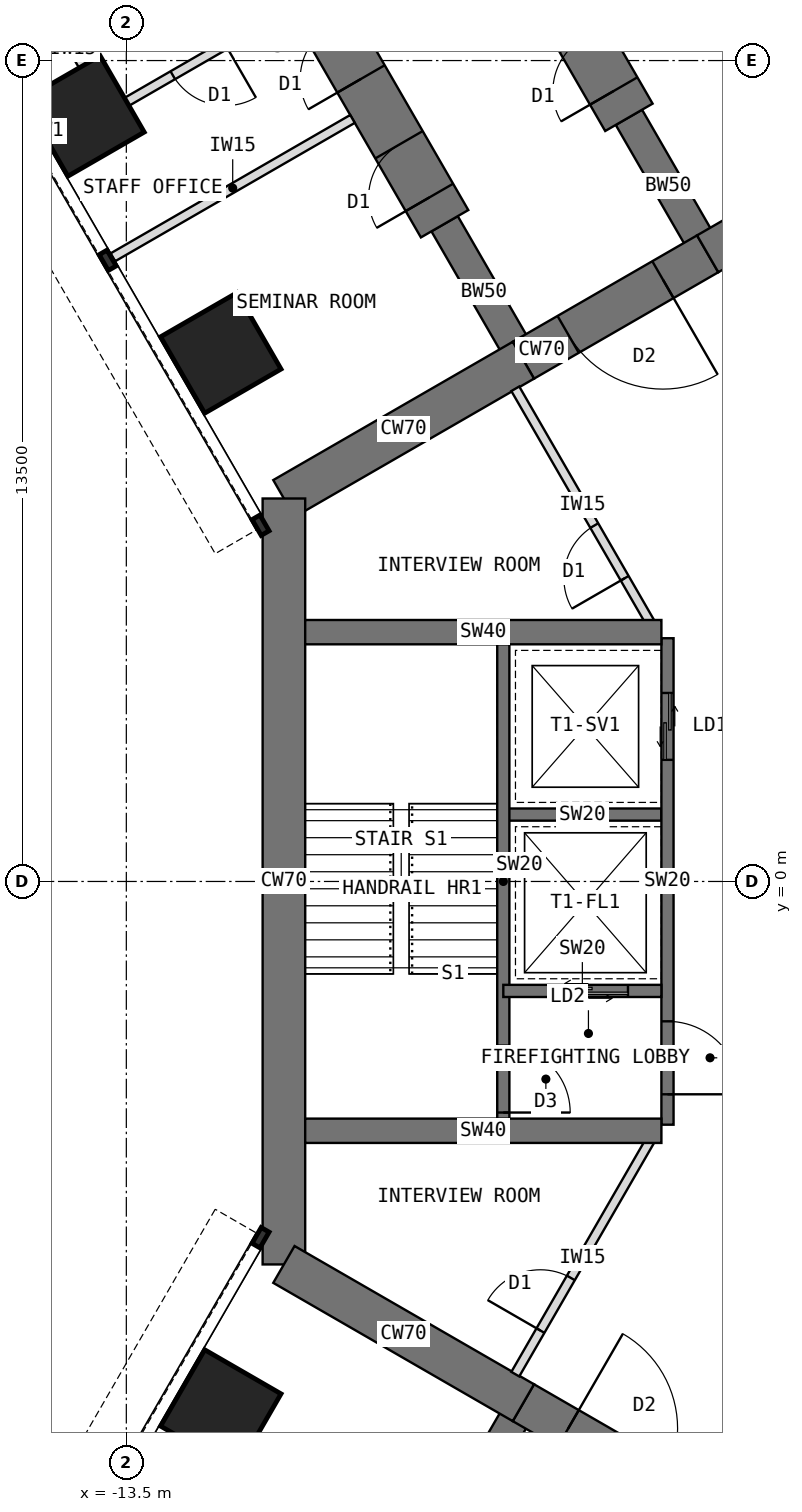
"""IFC4 building model, lengths in metres.
Left out: names, types, materials, properties, quantities, classifications, styles, units other than length and angle.
Written with IfcOpenShell. Run it as: python <this file> out.ifc"""

import sys

from ifc_helpers import new_model, si_unit, direction, frame, frame_2d, origin, origin_2d, place, context, subcontext, project, spatial, rectangle, extrude, element, fill, save


model = new_model("IFC4")
c1 = context("Model", 3, precision=1e-05, world=origin(), true_north=direction((0.0, 1.0)))
c2 = subcontext(c1, "Body", "Model", "MODEL_VIEW")
j1 = project(units=[si_unit("LENGTHUNIT", "METRE"), si_unit("PLANEANGLEUNIT", "RADIAN")], contexts=[c1])
p1 = place(None, origin())
s1 = spatial("IfcSite", under=j1, at=p1, CompositionType="ELEMENT")
p2 = place(p1, origin())
s2 = spatial("IfcBuilding", under=s1, at=p2, CompositionType="ELEMENT")
p3 = place(p2, frame((0.0, 0.0, 60.5)))
s3 = spatial("IfcBuildingStorey", under=s2, at=p3, CompositionType="ELEMENT", Elevation=60.5)
p4 = place(p3, frame((0.0, 12.596, 0.0), z_axis=(0.0, 0.0, 1.0), x_axis=(-0.866011268655, -0.500024481964, 0.0)))
e1 = element("IfcWall", 1, at=p4, inside=s3, PredefinedType="SHEAR", context=c2, shape_type="SweptSolid", body=[
    extrude(rectangle(XDim=4.548, YDim=0.7, at=frame_2d((2.274, 0.0))), origin(), (0.0, 0.0, 1.0), 4.0),
])
p5 = place(p3, frame((-3.939, 10.322, 0.0), z_axis=(0.0, 0.0, 1.0), x_axis=(-0.866019471182, -0.500010275428, 0.0)))
e2 = element("IfcWall", 2, at=p5, inside=s3, PredefinedType="SHEAR", context=c2, shape_type="SweptSolid", body=[
    extrude(rectangle(XDim=3.5, YDim=0.7, at=frame_2d((1.75, 0.0))), origin(), (0.0, 0.0, 1.0), 4.0),
])
p6 = place(p5, frame((0.85, 0.0, 0.0)))
e3 = element("IfcOpeningElement", 3, at=p6, cuts=e2, PredefinedType="OPENING", context=c2, shape_type="SweptSolid", body=[
    extrude(rectangle(XDim=1.8, YDim=2.1, at=frame_2d((0.9, 1.05))), frame((0.0, 0.36, 0.0), z_axis=(0.0, -1.0, 0.0), x_axis=(1.0, 0.0, 0.0)), (0.0, 0.0, 1.0), 0.72),
])
p7 = place(p3, frame((-6.97, 8.572, 0.0), z_axis=(0.0, 0.0, 1.0), x_axis=(-0.866034513004, -0.499984222037, 0.0)))
e4 = element("IfcWall", 4, at=p7, inside=s3, PredefinedType="SHEAR", context=c2, shape_type="SweptSolid", body=[
    extrude(rectangle(XDim=4.548, YDim=0.7, at=frame_2d((2.274, 0.0))), origin(), (0.0, 0.0, 1.0), 4.0),
])
p8 = place(p3, frame((-10.908, 6.298, 0.0), z_axis=(0.0, 0.0, 1.0), x_axis=(0.0, -1.0, 0.0)))
e5 = element("IfcWall", 5, at=p8, inside=s3, PredefinedType="SHEAR", context=c2, shape_type="SweptSolid", body=[
    extrude(rectangle(XDim=12.596, YDim=0.7, at=frame_2d((6.298, 0.0))), origin(), (0.0, 0.0, 1.0), 4.0),
])
p9 = place(p3, frame((-10.908, -6.298, 0.0), z_axis=(0.0, 0.0, 1.0), x_axis=(0.866034513004, -0.499984222037, 0.0)))
e6 = element("IfcWall", 6, at=p9, inside=s3, PredefinedType="SHEAR", context=c2, shape_type="SweptSolid", body=[
    extrude(rectangle(XDim=4.548, YDim=0.7, at=frame_2d((2.274, 0.0))), origin(), (0.0, 0.0, 1.0), 4.0),
])
p10 = place(p3, frame((-6.97, -8.572, 0.0), z_axis=(0.0, 0.0, 1.0), x_axis=(0.866019471182, -0.500010275428, 0.0)))
e7 = element("IfcWall", 7, at=p10, inside=s3, PredefinedType="SHEAR", context=c2, shape_type="SweptSolid", body=[
    extrude(rectangle(XDim=3.5, YDim=0.7, at=frame_2d((1.75, 0.0))), origin(), (0.0, 0.0, 1.0), 4.0),
])
p11 = place(p10, frame((0.85, 0.0, 0.0)))
e8 = element("IfcOpeningElement", 8, at=p11, cuts=e7, PredefinedType="OPENING", context=c2, shape_type="SweptSolid", body=[
    extrude(rectangle(XDim=1.8, YDim=2.1, at=frame_2d((0.9, 1.05))), frame((0.0, 0.36, 0.0), z_axis=(0.0, -1.0, 0.0), x_axis=(1.0, 0.0, 0.0)), (0.0, 0.0, 1.0), 0.72),
])
p12 = place(p3, frame((-6.97, 8.572, 0.0), z_axis=(0.0, 0.0, 1.0), x_axis=(-0.499988811324, 0.866031863473, 0.0)))
e9 = element("IfcWall", 9, at=p12, inside=s3, PredefinedType="SHEAR", context=c2, shape_type="SweptSolid", body=[
    extrude(rectangle(XDim=2.592, YDim=0.5, at=frame_2d((1.296, 0.0))), origin(), (0.0, 0.0, 1.0), 4.0),
])
p13 = place(p3, frame((-8.266, 10.816, 0.0), z_axis=(0.0, 0.0, 1.0), x_axis=(-0.499996231654, 0.866027579429, 0.0)))
e10 = element("IfcWall", 10, at=p13, inside=s3, PredefinedType="SHEAR", context=c2, shape_type="SweptSolid", body=[
    extrude(rectangle(XDim=13.2, YDim=0.9, at=frame_2d((6.6, 0.0))), origin(), (0.0, 0.0, 1.0), 4.0),
])
p14 = place(p13, frame((0.5, 0.0, 0.0)))
e11 = element("IfcOpeningElement", 11, at=p14, cuts=e10, PredefinedType="OPENING", context=c2, shape_type="SweptSolid", body=[
    extrude(rectangle(XDim=1.0, YDim=2.1, at=frame_2d((0.5, 1.05))), frame((0.0, 0.46, 0.0), z_axis=(0.0, -1.0, 0.0), x_axis=(1.0, 0.0, 0.0)), (0.0, 0.0, 1.0), 0.92),
])
p15 = place(p13, frame((2.75, 0.0, 0.0)))
e12 = element("IfcOpeningElement", 12, at=p15, cuts=e10, PredefinedType="OPENING", context=c2, shape_type="SweptSolid", body=[
    extrude(rectangle(XDim=1.0, YDim=2.1, at=frame_2d((0.5, 1.05))), frame((0.0, 0.46, 0.0), z_axis=(0.0, -1.0, 0.0), x_axis=(1.0, 0.0, 0.0)), (0.0, 0.0, 1.0), 0.92),
])
p16 = place(p13, frame((7.25, 0.0, 0.0)))
e13 = element("IfcOpeningElement", 13, at=p16, cuts=e10, PredefinedType="OPENING", context=c2, shape_type="SweptSolid", body=[
    extrude(rectangle(XDim=1.0, YDim=2.1, at=frame_2d((0.5, 1.05))), frame((0.0, 0.46, 0.0), z_axis=(0.0, -1.0, 0.0), x_axis=(1.0, 0.0, 0.0)), (0.0, 0.0, 1.0), 0.92),
])
p17 = place(p3, frame((-3.939, 10.322, 0.0), z_axis=(0.0, 0.0, 1.0), x_axis=(-0.499918158782, 0.866072649678, 0.0)))
e14 = element("IfcWall", 14, at=p17, inside=s3, PredefinedType="SHEAR", context=c2, shape_type="SweptSolid", body=[
    extrude(rectangle(XDim=2.592, YDim=0.5, at=frame_2d((1.296, 0.0))), origin(), (0.0, 0.0, 1.0), 4.0),
])
p18 = place(p3, frame((-5.234, 12.566, 0.0), z_axis=(0.0, 0.0, 1.0), x_axis=(-0.500010103361, 0.866019570528, 0.0)))
e15 = element("IfcWall", 15, at=p18, inside=s3, PredefinedType="SHEAR", context=c2, shape_type="SweptSolid", body=[
    extrude(rectangle(XDim=13.2, YDim=0.9, at=frame_2d((6.6, 0.0))), origin(), (0.0, 0.0, 1.0), 4.0),
])
p19 = place(p18, frame((0.5, 0.0, 0.0)))
e16 = element("IfcOpeningElement", 16, at=p19, cuts=e15, PredefinedType="OPENING", context=c2, shape_type="SweptSolid", body=[
    extrude(rectangle(XDim=1.0, YDim=2.1, at=frame_2d((0.5, 1.05))), frame((0.0, 0.46, 0.0), z_axis=(0.0, -1.0, 0.0), x_axis=(1.0, 0.0, 0.0)), (0.0, 0.0, 1.0), 0.92),
])
p20 = place(p18, frame((2.75, 0.0, 0.0)))
e17 = element("IfcOpeningElement", 17, at=p20, cuts=e15, PredefinedType="OPENING", context=c2, shape_type="SweptSolid", body=[
    extrude(rectangle(XDim=1.0, YDim=2.1, at=frame_2d((0.5, 1.05))), frame((0.0, 0.46, 0.0), z_axis=(0.0, -1.0, 0.0), x_axis=(1.0, 0.0, 0.0)), (0.0, 0.0, 1.0), 0.92),
])
p21 = place(p18, frame((7.25, 0.0, 0.0)))
e18 = element("IfcOpeningElement", 18, at=p21, cuts=e15, PredefinedType="OPENING", context=c2, shape_type="SweptSolid", body=[
    extrude(rectangle(XDim=1.0, YDim=2.1, at=frame_2d((0.5, 1.05))), frame((0.0, 0.46, 0.0), z_axis=(0.0, -1.0, 0.0), x_axis=(1.0, 0.0, 0.0)), (0.0, 0.0, 1.0), 0.92),
])
p22 = place(p3, frame((-6.97, -8.572, 0.0), z_axis=(0.0, 0.0, 1.0), x_axis=(-0.499988811324, -0.866031863473, 0.0)))
e19 = element("IfcWall", 19, at=p22, inside=s3, PredefinedType="SHEAR", context=c2, shape_type="SweptSolid", body=[
    extrude(rectangle(XDim=2.592, YDim=0.5, at=frame_2d((1.296, 0.0))), origin(), (0.0, 0.0, 1.0), 4.0),
])
for number, where, z_axis, x_axis in (
    (20, (-11.946, 8.691, 0.0), (0.0, 0.0, 1.0), (0.866, 0.5, 0.0)),
    (21, (-14.196, 12.588, 0.0), (0.0, 0.0, 1.0), (0.866, 0.5, 0.0)),
    (22, (-11.946, -8.691, 0.0), (0.0, 0.0, 1.0), (0.5, 0.866, 0.0)),
):
    element("IfcColumn", number, at=place(p3, frame(where, z_axis=z_axis, x_axis=x_axis)), inside=s3, PredefinedType="COLUMN", context=c2, shape_type="SweptSolid", body=[
        extrude(rectangle(XDim=1.45, YDim=1.45, at=origin_2d()), origin(), (0.0, 0.0, 1.0), 4.0),
    ])
p23 = place(p3, frame((-4.6, 4.0, 0.0), z_axis=(0.0, 0.0, 1.0), x_axis=(0.0, -1.0, 0.0)))
e23 = element("IfcWall", 23, at=p23, inside=s3, PredefinedType="SHEAR", context=c2, shape_type="SweptSolid", body=[
    extrude(rectangle(XDim=8.0, YDim=0.2, at=frame_2d((4.0, 0.0))), origin(), (0.0, 0.0, 1.0), 4.0),
])
p24 = place(p23, frame((6.3, 0.0, 0.0)))
e24 = element("IfcOpeningElement", 24, at=p24, cuts=e23, PredefinedType="OPENING", context=c2, shape_type="SweptSolid", body=[
    extrude(rectangle(XDim=1.2, YDim=2.1, at=frame_2d((0.6, 1.05))), frame((0.0, 0.11, 0.0), z_axis=(0.0, -1.0, 0.0), x_axis=(1.0, 0.0, 0.0)), (0.0, 0.0, 1.0), 0.22),
])
p25 = place(p23, frame((0.9, 0.0, 0.0)))
e25 = element("IfcOpeningElement", 25, at=p25, cuts=e23, PredefinedType="OPENING", context=c2, shape_type="SweptSolid", body=[
    extrude(rectangle(XDim=1.1, YDim=2.2, at=frame_2d((0.55, 1.1))), frame((0.0, 0.11, 0.0), z_axis=(0.0, -1.0, 0.0), x_axis=(1.0, 0.0, 0.0)), (0.0, 0.0, 1.0), 0.22),
])
p26 = place(p3, frame((-4.7, 1.1, 0.0), z_axis=(0.0, 0.0, 1.0), x_axis=(-1.0, 0.0, 0.0)))
e26 = element("IfcWall", 26, at=p26, inside=s3, PredefinedType="SHEAR", context=c2, shape_type="SweptSolid", body=[
    extrude(rectangle(XDim=2.6, YDim=0.2, at=frame_2d((1.3, 0.0))), origin(), (0.0, 0.0, 1.0), 4.0),
])
p27 = place(p3, frame((-4.7, -1.8, 0.0), z_axis=(0.0, 0.0, 1.0), x_axis=(-1.0, 0.0, 0.0)))
e27 = element("IfcWall", 27, at=p27, inside=s3, PredefinedType="SHEAR", context=c2, shape_type="SweptSolid", body=[
    extrude(rectangle(XDim=2.6, YDim=0.2, at=frame_2d((1.3, 0.0))), origin(), (0.0, 0.0, 1.0), 4.0),
])
p28 = place(p27, frame((0.55, 0.0, 0.0)))
e28 = element("IfcOpeningElement", 28, at=p28, cuts=e27, PredefinedType="OPENING", context=c2, shape_type="SweptSolid", body=[
    extrude(rectangle(XDim=1.3, YDim=2.2, at=frame_2d((0.65, 1.1))), frame((0.0, 0.11, 0.0), z_axis=(0.0, -1.0, 0.0), x_axis=(1.0, 0.0, 0.0)), (0.0, 0.0, 1.0), 0.22),
])
p29 = place(p3, frame((-7.3, 4.0, 0.0), z_axis=(0.0, 0.0, 1.0), x_axis=(0.0, -1.0, 0.0)))
e29 = element("IfcWall", 29, at=p29, inside=s3, PredefinedType="SHEAR", context=c2, shape_type="SweptSolid", body=[
    extrude(rectangle(XDim=8.0, YDim=0.2, at=frame_2d((4.0, 0.0))), origin(), (0.0, 0.0, 1.0), 4.0),
])
p30 = place(p29, frame((6.7, 0.0, 0.0)))
e30 = element("IfcOpeningElement", 30, at=p30, cuts=e29, PredefinedType="OPENING", context=c2, shape_type="SweptSolid", body=[
    extrude(rectangle(XDim=1.1, YDim=2.1, at=frame_2d((0.55, 1.05))), frame((0.0, 0.11, 0.0), z_axis=(0.0, -1.0, 0.0), x_axis=(1.0, 0.0, 0.0)), (0.0, 0.0, 1.0), 0.22),
])
for number, where, z_axis, x_axis in (
    (31, (-4.7, -4.1, 0.0), (0.0, 0.0, 1.0), (-1.0, 0.0, 0.0)),
    (32, (-4.7, 4.1, 0.0), (0.0, 0.0, 1.0), (-1.0, 0.0, 0.0)),
):
    element("IfcWall", number, at=place(p3, frame(where, z_axis=z_axis, x_axis=x_axis)), inside=s3, PredefinedType="SHEAR", context=c2, shape_type="SweptSolid", body=[
        extrude(rectangle(XDim=5.858, YDim=0.4, at=frame_2d((2.929, 0.0))), origin(), (0.0, 0.0, 1.0), 4.0),
    ])
p31 = place(p3, frame((-9.78, 12.54, 0.0), z_axis=(0.0, 0.0, 1.0), x_axis=(-0.866035472144, -0.499982560684, 0.0)))
e33 = element("IfcWall", 33, at=p31, inside=s3, PredefinedType="PARTITIONING", context=c2, shape_type="SweptSolid", body=[
    extrude(rectangle(XDim=4.55, YDim=0.15, at=frame_2d((2.275, 0.0))), origin(), (0.0, 0.0, 1.0), 3.8),
])
p32 = place(p3, frame((-13.775, 12.658, 0.0), z_axis=(0.0, 0.0, 1.0), x_axis=(-0.500033551112, 0.866006032174, 0.0)))
e34 = element("IfcWall", 34, at=p32, inside=s3, PredefinedType="PARTITIONING", context=c2, shape_type="SweptSolid", body=[
    extrude(rectangle(XDim=2.4, YDim=0.15, at=frame_2d((1.2, 0.0))), origin(), (0.0, 0.0, 1.0), 3.8),
])
p33 = place(p3, frame((-10.83, 14.359, 0.0), z_axis=(0.0, 0.0, 1.0), x_axis=(-0.865989465428, -0.500062241894, 0.0)))
e35 = element("IfcWall", 35, at=p33, inside=s3, PredefinedType="PARTITIONING", context=c2, shape_type="SweptSolid", body=[
    extrude(rectangle(XDim=3.4, YDim=0.15, at=frame_2d((1.7, 0.0))), origin(), (0.0, 0.0, 1.0), 3.8),
])
p34 = place(p33, frame((1.2, 0.0, 0.0)))
e36 = element("IfcOpeningElement", 36, at=p34, cuts=e35, PredefinedType="OPENING", context=c2, shape_type="SweptSolid", body=[
    extrude(rectangle(XDim=1.0, YDim=2.1, at=frame_2d((0.5, 1.05))), frame((0.0, 0.085, 0.0), z_axis=(0.0, -1.0, 0.0), x_axis=(1.0, 0.0, 0.0)), (0.0, 0.0, 1.0), 0.17),
])
p35 = place(p3, frame((-7.103, -8.103, 0.0), z_axis=(0.0, 0.0, 1.0), x_axis=(0.500007369519, 0.866021148949, 0.0)))
e37 = element("IfcWall", 37, at=p35, inside=s3, PredefinedType="PARTITIONING", context=c2, shape_type="SweptSolid", body=[
    extrude(rectangle(XDim=4.426, YDim=0.15, at=frame_2d((2.213, 0.0))), origin(), (0.0, 0.0, 1.0), 3.8),
])
p36 = place(p35, frame((0.828, 0.0, 0.0)))
e38 = element("IfcOpeningElement", 38, at=p36, cuts=e37, PredefinedType="OPENING", context=c2, shape_type="SweptSolid", body=[
    extrude(rectangle(XDim=1.0, YDim=2.1, at=frame_2d((0.5, 1.05))), frame((0.0, 0.085, 0.0), z_axis=(0.0, -1.0, 0.0), x_axis=(1.0, 0.0, 0.0)), (0.0, 0.0, 1.0), 0.17),
])
p37 = place(p3, frame((-4.89, 4.27, 0.0), z_axis=(0.0, 0.0, 1.0), x_axis=(-0.500007369519, 0.866021148949, 0.0)))
e39 = element("IfcWall", 39, at=p37, inside=s3, PredefinedType="PARTITIONING", context=c2, shape_type="SweptSolid", body=[
    extrude(rectangle(XDim=4.426, YDim=0.15, at=frame_2d((2.213, 0.0))), origin(), (0.0, 0.0, 1.0), 3.8),
])
p38 = place(p37, frame((0.828, 0.0, 0.0)))
e40 = element("IfcOpeningElement", 40, at=p38, cuts=e39, PredefinedType="OPENING", context=c2, shape_type="SweptSolid", body=[
    extrude(rectangle(XDim=1.0, YDim=2.1, at=frame_2d((0.5, 1.05))), frame((0.0, 0.085, 0.0), z_axis=(0.0, -1.0, 0.0), x_axis=(1.0, 0.0, 0.0)), (0.0, 0.0, 1.0), 0.17),
])
p39 = place(p24, origin())
e41 = element("IfcDoor", 41, at=p39, inside=s3, OperationType="SINGLE_SWING_RIGHT", PredefinedType="DOOR", context=c2, shape_type="SweptSolid", body=[
    extrude(rectangle(XDim=1.2, YDim=2.1, at=frame_2d((0.6, 1.05))), frame((0.0, 0.025, 0.0), z_axis=(0.0, -1.0, 0.0), x_axis=(1.0, 0.0, 0.0)), (0.0, 0.0, 1.0), 0.05),
])
fill(e24, e41)
p40 = place(p28, origin())
e42 = element("IfcDoor", 42, at=p40, inside=s3, OperationType="DOUBLE_DOOR_SLIDING", PredefinedType="DOOR", context=c2, shape_type="SweptSolid", body=[
    extrude(rectangle(XDim=1.3, YDim=2.2, at=frame_2d((0.65, 1.1))), frame((0.0, 0.025, 0.0), z_axis=(0.0, -1.0, 0.0), x_axis=(1.0, 0.0, 0.0)), (0.0, 0.0, 1.0), 0.05),
])
fill(e28, e42)
p41 = place(p25, origin())
e43 = element("IfcDoor", 43, at=p41, inside=s3, OperationType="DOUBLE_DOOR_SLIDING", PredefinedType="DOOR", context=c2, shape_type="SweptSolid", body=[
    extrude(rectangle(XDim=1.1, YDim=2.2, at=frame_2d((0.55, 1.1))), frame((0.0, 0.025, 0.0), z_axis=(0.0, -1.0, 0.0), x_axis=(1.0, 0.0, 0.0)), (0.0, 0.0, 1.0), 0.05),
])
fill(e25, e43)
p42 = place(p30, origin())
e44 = element("IfcDoor", 44, at=p42, inside=s3, OperationType="SINGLE_SWING_RIGHT", PredefinedType="DOOR", context=c2, shape_type="SweptSolid", body=[
    extrude(rectangle(XDim=1.1, YDim=2.1, at=frame_2d((0.55, 1.05))), frame((0.0, 0.025, 0.0), z_axis=(0.0, -1.0, 0.0), x_axis=(1.0, 0.0, 0.0)), (0.0, 0.0, 1.0), 0.05),
])
fill(e30, e44)
p43 = place(p6, origin())
e45 = element("IfcDoor", 45, at=p43, inside=s3, OperationType="DOUBLE_DOOR_DOUBLE_SWING", PredefinedType="DOOR", context=c2, shape_type="SweptSolid", body=[
    extrude(rectangle(XDim=1.72, YDim=2.06, at=frame_2d((0.9, 1.03))), frame((0.0, 0.025, 0.0), z_axis=(0.0, -1.0, 0.0), x_axis=(1.0, 0.0, 0.0)), (0.0, 0.0, 1.0), 0.05),
    extrude(rectangle(XDim=0.04, YDim=2.1, at=frame_2d((0.02, 1.05))), frame((0.0, 0.35, 0.0), z_axis=(0.0, -1.0, 0.0), x_axis=(1.0, 0.0, 0.0)), (0.0, 0.0, 1.0), 0.699),
    extrude(rectangle(XDim=0.04, YDim=2.1, at=frame_2d((1.78, 1.05))), frame((0.0, 0.35, 0.0), z_axis=(0.0, -1.0, 0.0), x_axis=(1.0, 0.0, 0.0)), (0.0, 0.0, 1.0), 0.699),
    extrude(rectangle(XDim=1.72, YDim=0.04, at=frame_2d((0.9, 2.08))), frame((0.0, 0.35, 0.0), z_axis=(0.0, -1.0, 0.0), x_axis=(1.0, 0.0, 0.0)), (0.0, 0.0, 1.0), 0.699),
])
fill(e3, e45)
p44 = place(p11, origin())
e46 = element("IfcDoor", 46, at=p44, inside=s3, OperationType="DOUBLE_DOOR_DOUBLE_SWING", PredefinedType="DOOR", context=c2, shape_type="SweptSolid", body=[
    extrude(rectangle(XDim=1.72, YDim=2.06, at=frame_2d((0.9, 1.03))), frame((0.0, 0.025, 0.0), z_axis=(0.0, -1.0, 0.0), x_axis=(1.0, 0.0, 0.0)), (0.0, 0.0, 1.0), 0.05),
    extrude(rectangle(XDim=0.04, YDim=2.1, at=frame_2d((0.02, 1.05))), frame((0.0, 0.35, 0.0), z_axis=(0.0, -1.0, 0.0), x_axis=(1.0, 0.0, 0.0)), (0.0, 0.0, 1.0), 0.699),
    extrude(rectangle(XDim=0.04, YDim=2.1, at=frame_2d((1.78, 1.05))), frame((0.0, 0.35, 0.0), z_axis=(0.0, -1.0, 0.0), x_axis=(1.0, 0.0, 0.0)), (0.0, 0.0, 1.0), 0.699),
    extrude(rectangle(XDim=1.72, YDim=0.04, at=frame_2d((0.9, 2.08))), frame((0.0, 0.35, 0.0), z_axis=(0.0, -1.0, 0.0), x_axis=(1.0, 0.0, 0.0)), (0.0, 0.0, 1.0), 0.699),
])
fill(e8, e46)
p45 = place(p34, origin())
e47 = element("IfcDoor", 47, at=p45, inside=s3, OperationType="SINGLE_SWING_LEFT", PredefinedType="DOOR", context=c2, shape_type="SweptSolid", body=[
    extrude(rectangle(XDim=1.0, YDim=2.1, at=frame_2d((0.5, 1.05))), frame((0.0, 0.025, 0.0), z_axis=(0.0, -1.0, 0.0), x_axis=(1.0, 0.0, 0.0)), (0.0, 0.0, 1.0), 0.05),
])
fill(e36, e47)
p46 = place(p36, origin())
e48 = element("IfcDoor", 48, at=p46, inside=s3, OperationType="SINGLE_SWING_LEFT", PredefinedType="DOOR", context=c2, shape_type="SweptSolid", body=[
    extrude(rectangle(XDim=1.0, YDim=2.1, at=frame_2d((0.5, 1.05))), frame((0.0, 0.025, 0.0), z_axis=(0.0, -1.0, 0.0), x_axis=(1.0, 0.0, 0.0)), (0.0, 0.0, 1.0), 0.05),
])
fill(e38, e48)
p47 = place(p38, origin())
e49 = element("IfcDoor", 49, at=p47, inside=s3, OperationType="SINGLE_SWING_LEFT", PredefinedType="DOOR", context=c2, shape_type="SweptSolid", body=[
    extrude(rectangle(XDim=1.0, YDim=2.1, at=frame_2d((0.5, 1.05))), frame((0.0, 0.025, 0.0), z_axis=(0.0, -1.0, 0.0), x_axis=(1.0, 0.0, 0.0)), (0.0, 0.0, 1.0), 0.05),
])
fill(e40, e49)
p48 = place(p14, origin())
e50 = element("IfcDoor", 50, at=p48, inside=s3, OperationType="SINGLE_SWING_LEFT", PredefinedType="DOOR", context=c2, shape_type="SweptSolid", body=[
    extrude(rectangle(XDim=0.92, YDim=2.06, at=frame_2d((0.5, 1.03))), frame((0.0, 0.025, 0.0), z_axis=(0.0, -1.0, 0.0), x_axis=(1.0, 0.0, 0.0)), (0.0, 0.0, 1.0), 0.05),
    extrude(rectangle(XDim=0.04, YDim=2.1, at=frame_2d((0.02, 1.05))), frame((0.0, 0.45, 0.0), z_axis=(0.0, -1.0, 0.0), x_axis=(1.0, 0.0, 0.0)), (0.0, 0.0, 1.0), 0.899),
    extrude(rectangle(XDim=0.04, YDim=2.1, at=frame_2d((0.98, 1.05))), frame((0.0, 0.45, 0.0), z_axis=(0.0, -1.0, 0.0), x_axis=(1.0, 0.0, 0.0)), (0.0, 0.0, 1.0), 0.899),
    extrude(rectangle(XDim=0.92, YDim=0.04, at=frame_2d((0.5, 2.08))), frame((0.0, 0.45, 0.0), z_axis=(0.0, -1.0, 0.0), x_axis=(1.0, 0.0, 0.0)), (0.0, 0.0, 1.0), 0.899),
])
fill(e11, e50)
p49 = place(p15, origin())
e51 = element("IfcDoor", 51, at=p49, inside=s3, OperationType="SINGLE_SWING_LEFT", PredefinedType="DOOR", context=c2, shape_type="SweptSolid", body=[
    extrude(rectangle(XDim=0.92, YDim=2.06, at=frame_2d((0.5, 1.03))), frame((0.0, 0.025, 0.0), z_axis=(0.0, -1.0, 0.0), x_axis=(1.0, 0.0, 0.0)), (0.0, 0.0, 1.0), 0.05),
    extrude(rectangle(XDim=0.04, YDim=2.1, at=frame_2d((0.02, 1.05))), frame((0.0, 0.45, 0.0), z_axis=(0.0, -1.0, 0.0), x_axis=(1.0, 0.0, 0.0)), (0.0, 0.0, 1.0), 0.899),
    extrude(rectangle(XDim=0.04, YDim=2.1, at=frame_2d((0.98, 1.05))), frame((0.0, 0.45, 0.0), z_axis=(0.0, -1.0, 0.0), x_axis=(1.0, 0.0, 0.0)), (0.0, 0.0, 1.0), 0.899),
    extrude(rectangle(XDim=0.92, YDim=0.04, at=frame_2d((0.5, 2.08))), frame((0.0, 0.45, 0.0), z_axis=(0.0, -1.0, 0.0), x_axis=(1.0, 0.0, 0.0)), (0.0, 0.0, 1.0), 0.899),
])
fill(e12, e51)
p50 = place(p19, origin())
e52 = element("IfcDoor", 52, at=p50, inside=s3, OperationType="SINGLE_SWING_LEFT", PredefinedType="DOOR", context=c2, shape_type="SweptSolid", body=[
    extrude(rectangle(XDim=0.92, YDim=2.06, at=frame_2d((0.5, 1.03))), frame((0.0, 0.025, 0.0), z_axis=(0.0, -1.0, 0.0), x_axis=(1.0, 0.0, 0.0)), (0.0, 0.0, 1.0), 0.05),
    extrude(rectangle(XDim=0.04, YDim=2.1, at=frame_2d((0.02, 1.05))), frame((0.0, 0.45, 0.0), z_axis=(0.0, -1.0, 0.0), x_axis=(1.0, 0.0, 0.0)), (0.0, 0.0, 1.0), 0.899),
    extrude(rectangle(XDim=0.04, YDim=2.1, at=frame_2d((0.98, 1.05))), frame((0.0, 0.45, 0.0), z_axis=(0.0, -1.0, 0.0), x_axis=(1.0, 0.0, 0.0)), (0.0, 0.0, 1.0), 0.899),
    extrude(rectangle(XDim=0.92, YDim=0.04, at=frame_2d((0.5, 2.08))), frame((0.0, 0.45, 0.0), z_axis=(0.0, -1.0, 0.0), x_axis=(1.0, 0.0, 0.0)), (0.0, 0.0, 1.0), 0.899),
])
fill(e16, e52)
save(model, sys.argv[1])
